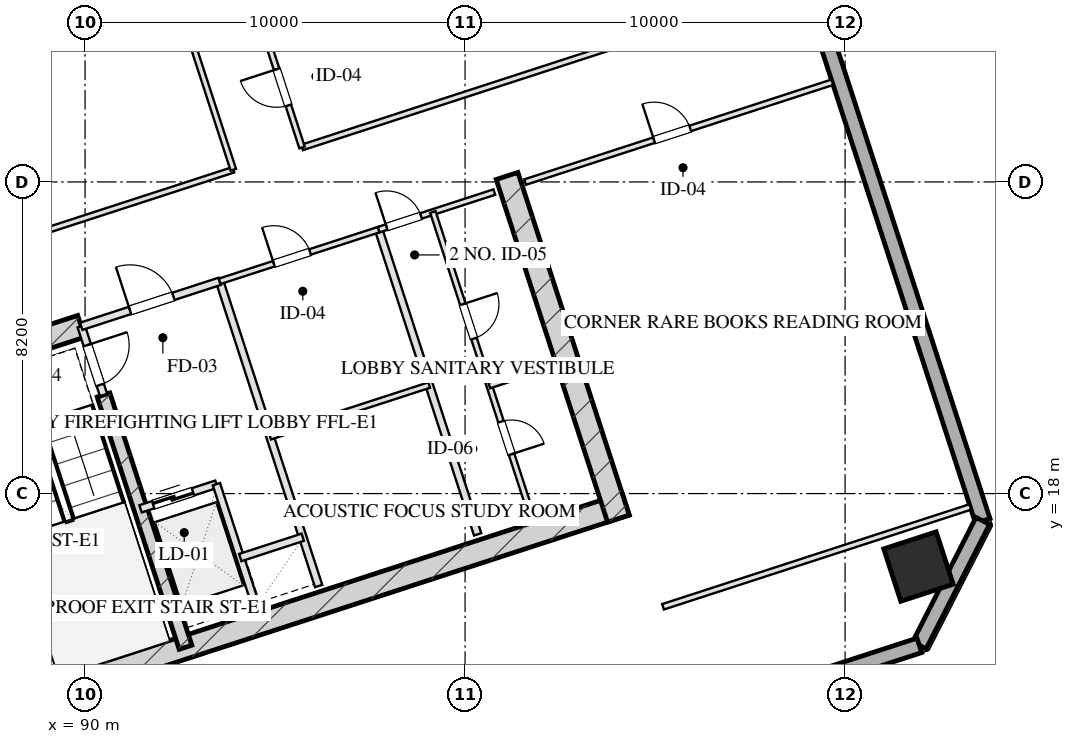
"""IFC4 building model, lengths in metres.
Left out: names, types, materials, properties, quantities, classifications, styles, units other than length and angle.
Written with IfcOpenShell. Run it as: python <this file> out.ifc"""

import sys

from ifc_helpers import new_model, si_unit, direction, frame, frame_2d, origin, origin_2d, place, context, subcontext, project, spatial, rectangle, hollow_rectangle, extrude, element, fill, save


model = new_model("IFC4")
c1 = context("Model", 3, precision=1e-05, world=origin(), true_north=direction((0.0, 1.0)))
c2 = subcontext(c1, "Body", "Model", "MODEL_VIEW")
j1 = project(units=[si_unit("LENGTHUNIT", "METRE"), si_unit("PLANEANGLEUNIT", "RADIAN")], contexts=[c1])
p1 = place(None, origin())
s1 = spatial("IfcSite", under=j1, at=p1, CompositionType="ELEMENT")
p2 = place(p1, origin())
s2 = spatial("IfcBuilding", under=s1, at=p2, CompositionType="ELEMENT")
p3 = place(p2, frame((0.0, 0.0, 103.5)))
s3 = spatial("IfcBuildingStorey", under=s2, at=p3, CompositionType="ELEMENT", Elevation=103.5)
p4 = place(p3, frame((88.63, 12.652, 0.0), z_axis=(0.0, 0.0, 1.0), x_axis=(0.95105714907, 0.309015046886, 0.0)))
e1 = element("IfcWall", 1, at=p4, inside=s3, PredefinedType="SHEAR", context=c2, shape_type="SweptSolid", body=[
    extrude(rectangle(XDim=16.4, YDim=0.6, at=frame_2d((8.2, 0.0))), origin(), (0.0, 0.0, 1.0), 3.45),
])
p5 = place(p3, frame((86.078, 21.475, 0.0), z_axis=(0.0, 0.0, 1.0), x_axis=(0.309017938678, -0.951056209472, 0.0)))
e2 = element("IfcWall", 2, at=p5, inside=s3, PredefinedType="SHEAR", context=c2, shape_type="SweptSolid", body=[
    extrude(rectangle(XDim=9.48, YDim=0.6, at=frame_2d((4.74, 0.0))), origin(), (0.0, 0.0, 1.0), 3.45),
])
p6 = place(p3, frame((101.105, 26.358, 0.0), z_axis=(0.0, 0.0, 1.0), x_axis=(0.309010370028, -0.95105866865, 0.0)))
e3 = element("IfcWall", 3, at=p6, inside=s3, PredefinedType="SHEAR", context=c2, shape_type="SweptSolid", body=[
    extrude(rectangle(XDim=9.48, YDim=0.6, at=frame_2d((4.74, 0.0))), origin(), (0.0, 0.0, 1.0), 3.45),
])
p7 = place(p3, frame((90.486, 20.594, 0.0), z_axis=(0.0, 0.0, 1.0), x_axis=(0.309020428229, -0.951055400562, 0.0)))
e4 = element("IfcWall", 4, at=p7, inside=s3, PredefinedType="SHEAR", context=c2, shape_type="SweptSolid", body=[
    extrude(rectangle(XDim=6.98, YDim=0.35, at=frame_2d((3.49, 0.0))), origin(), (0.0, 0.0, 1.0), 3.45),
])
p8 = place(p3, frame((85.886, 21.097, 0.0), z_axis=(0.0, 0.0, 1.0), x_axis=(0.951068073652, 0.308981422225, 0.0)))
e5 = element("IfcWall", 5, at=p8, inside=s3, PredefinedType="SHEAR", context=c2, shape_type="SweptSolid", body=[
    extrude(rectangle(XDim=4.22, YDim=0.6, at=frame_2d((2.11, 0.0))), origin(), (0.0, 0.0, 1.0), 3.45),
])
p9 = place(p3, frame((111.931, 16.08, 0.0), z_axis=(0.0, 0.0, 1.0), x_axis=(0.951056516295, 0.309016994375, 0.0)))
e6 = element("IfcColumn", 6, at=p9, inside=s3, PredefinedType="COLUMN", context=c2, shape_type="SweptSolid", body=[
    extrude(hollow_rectangle(XDim=1.45, YDim=1.45, WallThickness=0.05, at=origin_2d()), origin(), (0.0, 0.0, 1.0), 3.451),
])
p10 = place(p3, frame((99.284, 61.41, 0.0), z_axis=(0.0, 0.0, 1.0), x_axis=(0.309017542002, -0.95105633836, 0.0)))
e7 = element("IfcWall", 7, at=p10, inside=s3, PredefinedType="SOLIDWALL", context=c2, shape_type="SweptSolid", body=[
    extrude(rectangle(XDim=46.4, YDim=0.4, at=frame_2d((23.2, 0.0))), origin(), (0.0, 0.0, 1.0), 2.61),
])
p11 = place(p10, frame((25.746, 0.0, 0.0)))
e8 = element("IfcOpeningElement", 8, at=p11, cuts=e7, PredefinedType="OPENING", context=c2, shape_type="SweptSolid", body=[
    extrude(rectangle(XDim=1.1, YDim=2.15, at=frame_2d((0.55, 1.075))), frame((0.0, 0.21, 0.0), z_axis=(0.0, -1.0, 0.0), x_axis=(1.0, 0.0, 0.0)), (0.0, 0.0, 1.0), 0.42),
])
p12 = place(p3, frame((113.623, 17.281, 0.0), z_axis=(0.0, 0.0, 1.0), x_axis=(-0.454026238093, -0.890988313685, 0.0)))
e9 = element("IfcWall", 9, at=p12, inside=s3, PredefinedType="SOLIDWALL", context=c2, shape_type="SweptSolid", body=[
    extrude(rectangle(XDim=3.677, YDim=0.4, at=frame_2d((1.838, 0.0))), origin(), (0.0, 0.0, 1.0), 2.61),
])
p13 = place(p3, frame((111.953, 14.005, 0.0), z_axis=(0.0, 0.0, 1.0), x_axis=(-0.95105505922, -0.309021478754, 0.0)))
e10 = element("IfcWall", 10, at=p13, inside=s3, PredefinedType="SOLIDWALL", context=c2, shape_type="SweptSolid", body=[
    extrude(rectangle(XDim=29.4, YDim=0.4, at=frame_2d((14.7, 0.0))), origin(), (0.0, 0.0, 1.0), 2.61),
])
p14 = place(p3, frame((89.899, 22.401, 0.0), z_axis=(0.0, 0.0, 1.0), x_axis=(0.308932062672, -0.951084108086, 0.0)))
e11 = element("IfcWall", 11, at=p14, inside=s3, PredefinedType="PARTITIONING", context=c2, shape_type="SweptSolid", body=[
    extrude(rectangle(XDim=1.9, YDim=0.2, at=frame_2d((0.95, 0.0))), origin(), (0.0, 0.0, 1.0), 3.175),
])
p15 = place(p14, frame((0.52, 0.0, 0.0)))
e12 = element("IfcOpeningElement", 12, at=p15, cuts=e11, PredefinedType="OPENING", context=c2, shape_type="SweptSolid", body=[
    extrude(rectangle(XDim=1.1, YDim=2.05, at=frame_2d((0.55, 1.025))), frame((0.0, 0.11, 0.0), z_axis=(0.0, -1.0, 0.0), x_axis=(1.0, 0.0, 0.0)), (0.0, 0.0, 1.0), 0.22),
])
p16 = place(p3, frame((93.542, 23.585, 0.0), z_axis=(0.0, 0.0, 1.0), x_axis=(0.309042196757, -0.951048327176, 0.0)))
e13 = element("IfcWall", 13, at=p16, inside=s3, PredefinedType="PARTITIONING", context=c2, shape_type="SweptSolid", body=[
    extrude(rectangle(XDim=8.43, YDim=0.2, at=frame_2d((4.215, 0.0))), origin(), (0.0, 0.0, 1.0), 3.175),
])
p17 = place(p3, frame((89.899, 22.401, 0.0), z_axis=(0.0, 0.0, 1.0), x_axis=(0.951046716504, 0.309047153403, 0.0)))
e14 = element("IfcWall", 14, at=p17, inside=s3, PredefinedType="PARTITIONING", context=c2, shape_type="SweptSolid", body=[
    extrude(rectangle(XDim=3.83, YDim=0.2, at=frame_2d((1.915, 0.0))), origin(), (0.0, 0.0, 1.0), 3.175),
])
p18 = place(p17, frame((1.35, 0.0, 0.0)))
e15 = element("IfcOpeningElement", 15, at=p18, cuts=e14, PredefinedType="OPENING", context=c2, shape_type="SweptSolid", body=[
    extrude(rectangle(XDim=1.2, YDim=2.05, at=frame_2d((0.6, 1.025))), frame((0.0, 0.11, 0.0), z_axis=(0.0, -1.0, 0.0), x_axis=(1.0, 0.0, 0.0)), (0.0, 0.0, 1.0), 0.22),
])
p19 = place(p3, frame((91.46, 17.598, 0.0), z_axis=(0.0, 0.0, 1.0), x_axis=(0.951062257173, 0.308999325213, 0.0)))
e16 = element("IfcWall", 16, at=p19, inside=s3, PredefinedType="PARTITIONING", context=c2, shape_type="SweptSolid", body=[
    extrude(rectangle(XDim=2.1, YDim=0.2, at=frame_2d((1.05, 0.0))), origin(), (0.0, 0.0, 1.0), 3.175),
])
p20 = place(p19, frame((0.35, 0.0, 0.0)))
e17 = element("IfcOpeningElement", 17, at=p20, cuts=e16, PredefinedType="OPENING", context=c2, shape_type="SweptSolid", body=[
    extrude(rectangle(XDim=1.1, YDim=2.05, at=frame_2d((0.55, 1.025))), frame((0.0, 0.11, 0.0), z_axis=(0.0, -1.0, 0.0), x_axis=(1.0, 0.0, 0.0)), (0.0, 0.0, 1.0), 0.22),
])
p21 = place(p3, frame((93.457, 18.247, 0.0), z_axis=(0.0, 0.0, 1.0), x_axis=(0.3089935693, -0.951064127245, 0.0)))
e18 = element("IfcWall", 18, at=p21, inside=s3, PredefinedType="PARTITIONING", context=c2, shape_type="SweptSolid", body=[
    extrude(rectangle(XDim=3.7, YDim=0.2, at=frame_2d((1.85, 0.0))), origin(), (0.0, 0.0, 1.0), 3.175),
])
p22 = place(p3, frame((94.084, 16.317, 0.0), z_axis=(0.0, 0.0, 1.0), x_axis=(0.951041328149, 0.309063734775, 0.0)))
e19 = element("IfcWall", 19, at=p22, inside=s3, PredefinedType="PARTITIONING", context=c2, shape_type="SweptSolid", body=[
    extrude(rectangle(XDim=1.73, YDim=0.2, at=frame_2d((0.865, 0.0))), origin(), (0.0, 0.0, 1.0), 3.175),
])
p23 = place(p3, frame((97.727, 24.944, 0.0), z_axis=(0.0, 0.0, 1.0), x_axis=(0.309016001439, -0.951056838919, 0.0)))
e20 = element("IfcWall", 20, at=p23, inside=s3, PredefinedType="PARTITIONING", context=c2, shape_type="SweptSolid", body=[
    extrude(rectangle(XDim=8.43, YDim=0.2, at=frame_2d((4.215, 0.0))), origin(), (0.0, 0.0, 1.0), 3.175),
])
p24 = place(p3, frame((93.542, 23.585, 0.0), z_axis=(0.0, 0.0, 1.0), x_axis=(0.951063829732, 0.308994485023, 0.0)))
e21 = element("IfcWall", 21, at=p24, inside=s3, PredefinedType="PARTITIONING", context=c2, shape_type="SweptSolid", body=[
    extrude(rectangle(XDim=4.4, YDim=0.15, at=frame_2d((2.2, 0.0))), origin(), (0.0, 0.0, 1.0), 3.175),
])
p25 = place(p24, frame((1.5, 0.0, 0.0)))
e22 = element("IfcOpeningElement", 22, at=p25, cuts=e21, PredefinedType="OPENING", context=c2, shape_type="SweptSolid", body=[
    extrude(rectangle(XDim=1.0, YDim=2.05, at=frame_2d((0.5, 1.025))), frame((0.0, 0.085, 0.0), z_axis=(0.0, -1.0, 0.0), x_axis=(1.0, 0.0, 0.0)), (0.0, 0.0, 1.0), 0.17),
])
p26 = place(p3, frame((94.871, 19.495, 0.0), z_axis=(0.0, 0.0, 1.0), x_axis=(0.951042223598, 0.309060979314, 0.0)))
e23 = element("IfcWall", 23, at=p26, inside=s3, PredefinedType="PARTITIONING", context=c2, shape_type="SweptSolid", body=[
    extrude(rectangle(XDim=4.4, YDim=0.15, at=frame_2d((2.2, 0.0))), origin(), (0.0, 0.0, 1.0), 3.175),
])
p27 = place(p3, frame((97.727, 24.944, 0.0), z_axis=(0.0, 0.0, 1.0), x_axis=(0.951036872128, 0.309077446369, 0.0)))
e24 = element("IfcWall", 24, at=p27, inside=s3, PredefinedType="PARTITIONING", context=c2, shape_type="SweptSolid", body=[
    extrude(rectangle(XDim=3.2, YDim=0.15, at=frame_2d((1.6, 0.0))), origin(), (0.0, 0.0, 1.0), 3.175),
])
p28 = place(p27, frame((0.22, 0.0, 0.0)))
e25 = element("IfcOpeningElement", 25, at=p28, cuts=e24, PredefinedType="OPENING", context=c2, shape_type="SweptSolid", body=[
    extrude(rectangle(XDim=0.95, YDim=2.05, at=frame_2d((0.475, 1.025))), frame((0.0, 0.085, 0.0), z_axis=(0.0, -1.0, 0.0), x_axis=(1.0, 0.0, 0.0)), (0.0, 0.0, 1.0), 0.17),
])
p29 = place(p3, frame((99.153, 25.408, 0.0), z_axis=(0.0, 0.0, 1.0), x_axis=(0.309016001439, -0.951056838919, 0.0)))
e26 = element("IfcWall", 26, at=p29, inside=s3, PredefinedType="PARTITIONING", context=c2, shape_type="SweptSolid", body=[
    extrude(rectangle(XDim=8.43, YDim=0.15, at=frame_2d((4.215, 0.0))), origin(), (0.0, 0.0, 1.0), 3.175),
])
p30 = place(p29, frame((2.55, 0.0, 0.0)))
e27 = element("IfcOpeningElement", 27, at=p30, cuts=e26, PredefinedType="OPENING", context=c2, shape_type="SweptSolid", body=[
    extrude(rectangle(XDim=0.95, YDim=2.05, at=frame_2d((0.475, 1.025))), frame((0.0, 0.085, 0.0), z_axis=(0.0, -1.0, 0.0), x_axis=(1.0, 0.0, 0.0)), (0.0, 0.0, 1.0), 0.17),
])
p31 = place(p29, frame((5.8, 0.0, 0.0)))
e28 = element("IfcOpeningElement", 28, at=p31, cuts=e26, PredefinedType="OPENING", context=c2, shape_type="SweptSolid", body=[
    extrude(rectangle(XDim=0.9, YDim=2.05, at=frame_2d((0.45, 1.025))), frame((0.0, 0.085, 0.0), z_axis=(0.0, -1.0, 0.0), x_axis=(1.0, 0.0, 0.0)), (0.0, 0.0, 1.0), 0.17),
])
p32 = place(p3, frame((100.636, 20.843, 0.0), z_axis=(0.0, 0.0, 1.0), x_axis=(0.951040401051, 0.309066587596, 0.0)))
e29 = element("IfcWall", 29, at=p32, inside=s3, PredefinedType="PARTITIONING", context=c2, shape_type="SweptSolid", body=[
    extrude(rectangle(XDim=1.7, YDim=0.15, at=frame_2d((0.85, 0.0))), origin(), (0.0, 0.0, 1.0), 3.175),
])
p33 = place(p3, frame((105.209, 15.021, 0.0), z_axis=(0.0, 0.0, 1.0), x_axis=(0.951054329824, 0.309023723562, 0.0)))
e30 = element("IfcWall", 30, at=p33, inside=s3, PredefinedType="PARTITIONING", context=c2, shape_type="SweptSolid", body=[
    extrude(rectangle(XDim=8.5, YDim=0.15, at=frame_2d((4.25, 0.0))), origin(), (0.0, 0.0, 1.0), 3.175),
])
p34 = place(p3, frame((101.578, 26.196, 0.0), z_axis=(0.0, 0.0, 1.0), x_axis=(0.951062770994, 0.308997743729, 0.0)))
e31 = element("IfcWall", 31, at=p34, inside=s3, PredefinedType="PARTITIONING", context=c2, shape_type="SweptSolid", body=[
    extrude(rectangle(XDim=8.5, YDim=0.15, at=frame_2d((4.25, 0.0))), origin(), (0.0, 0.0, 1.0), 3.175),
])
p35 = place(p34, frame((3.57, 0.0, 0.0)))
e32 = element("IfcOpeningElement", 32, at=p35, cuts=e31, PredefinedType="OPENING", context=c2, shape_type="SweptSolid", body=[
    extrude(rectangle(XDim=1.0, YDim=2.05, at=frame_2d((0.5, 1.025))), frame((0.0, 0.085, 0.0), z_axis=(0.0, -1.0, 0.0), x_axis=(1.0, 0.0, 0.0)), (0.0, 0.0, 1.0), 0.17),
])
p36 = place(p3, frame((85.676, 23.847, 0.0), z_axis=(0.0, 0.0, 1.0), x_axis=(0.951063309554, 0.308996086091, 0.0)))
e33 = element("IfcWall", 33, at=p36, inside=s3, PredefinedType="PARTITIONING", context=c2, shape_type="SweptSolid", body=[
    extrude(rectangle(XDim=8.65, YDim=0.15, at=frame_2d((4.325, 0.0))), origin(), (0.0, 0.0, 1.0), 3.175),
])
p37 = place(p3, frame((95.709, 27.107, 0.0), z_axis=(0.0, 0.0, 1.0), x_axis=(0.951056688031, 0.309016465825, 0.0)))
e34 = element("IfcWall", 34, at=p37, inside=s3, PredefinedType="PARTITIONING", context=c2, shape_type="SweptSolid", body=[
    extrude(rectangle(XDim=13.8, YDim=0.15, at=frame_2d((6.9, 0.0))), origin(), (0.0, 0.0, 1.0), 3.175),
])
p38 = place(p3, frame((93.903, 26.52, 0.0), z_axis=(0.0, 0.0, 1.0), x_axis=(-0.30901773025, 0.951056277195, 0.0)))
e35 = element("IfcWall", 35, at=p38, inside=s3, PredefinedType="PARTITIONING", context=c2, shape_type="SweptSolid", body=[
    extrude(rectangle(XDim=16.64, YDim=0.15, at=frame_2d((8.32, 0.0))), origin(), (0.0, 0.0, 1.0), 3.175),
])
p39 = place(p3, frame((95.709, 27.107, 0.0), z_axis=(0.0, 0.0, 1.0), x_axis=(-0.30901773025, 0.951056277195, 0.0)))
e36 = element("IfcWall", 36, at=p39, inside=s3, PredefinedType="PARTITIONING", context=c2, shape_type="SweptSolid", body=[
    extrude(rectangle(XDim=16.64, YDim=0.15, at=frame_2d((8.32, 0.0))), origin(), (0.0, 0.0, 1.0), 3.175),
])
p40 = place(p39, frame((1.164, 0.0, 0.0)))
e37 = element("IfcOpeningElement", 37, at=p40, cuts=e36, PredefinedType="OPENING", context=c2, shape_type="SweptSolid", body=[
    extrude(rectangle(XDim=1.0, YDim=2.05, at=frame_2d((0.5, 1.025))), frame((0.0, 0.085, 0.0), z_axis=(0.0, -1.0, 0.0), x_axis=(1.0, 0.0, 0.0)), (0.0, 0.0, 1.0), 0.17),
])
p41 = place(p39, frame((4.724, 0.0, 0.0)))
e38 = element("IfcOpeningElement", 38, at=p41, cuts=e36, PredefinedType="OPENING", context=c2, shape_type="SweptSolid", body=[
    extrude(rectangle(XDim=1.0, YDim=2.05, at=frame_2d((0.5, 1.025))), frame((0.0, 0.085, 0.0), z_axis=(0.0, -1.0, 0.0), x_axis=(1.0, 0.0, 0.0)), (0.0, 0.0, 1.0), 0.17),
])
p42 = place(p39, frame((7.82, 0.0, 0.0)))
e39 = element("IfcOpeningElement", 39, at=p42, cuts=e36, PredefinedType="OPENING", context=c2, shape_type="SweptSolid", body=[
    extrude(rectangle(XDim=1.05, YDim=2.05, at=frame_2d((0.525, 1.025))), frame((0.0, 0.085, 0.0), z_axis=(0.0, -1.0, 0.0), x_axis=(1.0, 0.0, 0.0)), (0.0, 0.0, 1.0), 0.17),
])
p43 = place(p39, frame((10.92, 0.0, 0.0)))
e40 = element("IfcOpeningElement", 40, at=p43, cuts=e36, PredefinedType="OPENING", context=c2, shape_type="SweptSolid", body=[
    extrude(rectangle(XDim=1.0, YDim=2.05, at=frame_2d((0.5, 1.025))), frame((0.0, 0.085, 0.0), z_axis=(0.0, -1.0, 0.0), x_axis=(1.0, 0.0, 0.0)), (0.0, 0.0, 1.0), 0.17),
])
p44 = place(p39, frame((14.48, 0.0, 0.0)))
e41 = element("IfcOpeningElement", 41, at=p44, cuts=e36, PredefinedType="OPENING", context=c2, shape_type="SweptSolid", body=[
    extrude(rectangle(XDim=1.0, YDim=2.05, at=frame_2d((0.5, 1.025))), frame((0.0, 0.085, 0.0), z_axis=(0.0, -1.0, 0.0), x_axis=(1.0, 0.0, 0.0)), (0.0, 0.0, 1.0), 0.17),
])
p45 = place(p15, origin())
e42 = element("IfcDoor", 42, at=p45, inside=s3, OperationType="SINGLE_SWING_LEFT", PredefinedType="DOOR", context=c2, shape_type="SweptSolid", body=[
    extrude(rectangle(XDim=1.1, YDim=2.05, at=frame_2d((0.55, 1.025))), frame((0.0, 0.025, 0.0), z_axis=(0.0, -1.0, 0.0), x_axis=(1.0, 0.0, 0.0)), (0.0, 0.0, 1.0), 0.05),
])
fill(e12, e42)
p46 = place(p18, origin())
e43 = element("IfcDoor", 43, at=p46, inside=s3, OperationType="SINGLE_SWING_LEFT", PredefinedType="DOOR", context=c2, shape_type="SweptSolid", body=[
    extrude(rectangle(XDim=1.2, YDim=2.05, at=frame_2d((0.6, 1.025))), frame((0.0, 0.025, 0.0), z_axis=(0.0, -1.0, 0.0), x_axis=(1.0, 0.0, 0.0)), (0.0, 0.0, 1.0), 0.05),
])
fill(e15, e43)
p47 = place(p20, origin())
e44 = element("IfcDoor", 44, at=p47, inside=s3, OperationType="DOUBLE_DOOR_SLIDING", PredefinedType="DOOR", context=c2, shape_type="SweptSolid", body=[
    extrude(rectangle(XDim=1.1, YDim=2.05, at=frame_2d((0.55, 1.025))), frame((0.0, 0.025, 0.0), z_axis=(0.0, -1.0, 0.0), x_axis=(1.0, 0.0, 0.0)), (0.0, 0.0, 1.0), 0.05),
])
fill(e17, e44)
p48 = place(p25, origin())
e45 = element("IfcDoor", 45, at=p48, inside=s3, OperationType="SINGLE_SWING_LEFT", PredefinedType="DOOR", context=c2, shape_type="SweptSolid", body=[
    extrude(rectangle(XDim=1.0, YDim=2.05, at=frame_2d((0.5, 1.025))), frame((0.0, 0.025, 0.0), z_axis=(0.0, -1.0, 0.0), x_axis=(1.0, 0.0, 0.0)), (0.0, 0.0, 1.0), 0.05),
])
fill(e22, e45)
p49 = place(p28, origin())
e46 = element("IfcDoor", 46, at=p49, inside=s3, OperationType="SINGLE_SWING_LEFT", PredefinedType="DOOR", context=c2, shape_type="SweptSolid", body=[
    extrude(rectangle(XDim=0.95, YDim=2.05, at=frame_2d((0.475, 1.025))), frame((0.0, 0.025, 0.0), z_axis=(0.0, -1.0, 0.0), x_axis=(1.0, 0.0, 0.0)), (0.0, 0.0, 1.0), 0.05),
])
fill(e25, e46)
p50 = place(p30, origin())
e47 = element("IfcDoor", 47, at=p50, inside=s3, OperationType="SINGLE_SWING_LEFT", PredefinedType="DOOR", context=c2, shape_type="SweptSolid", body=[
    extrude(rectangle(XDim=0.95, YDim=2.05, at=frame_2d((0.475, 1.025))), frame((0.0, 0.025, 0.0), z_axis=(0.0, -1.0, 0.0), x_axis=(1.0, 0.0, 0.0)), (0.0, 0.0, 1.0), 0.05),
])
fill(e27, e47)
p51 = place(p31, origin())
e48 = element("IfcDoor", 48, at=p51, inside=s3, OperationType="SINGLE_SWING_RIGHT", PredefinedType="DOOR", context=c2, shape_type="SweptSolid", body=[
    extrude(rectangle(XDim=0.9, YDim=2.05, at=frame_2d((0.45, 1.025))), frame((0.0, 0.025, 0.0), z_axis=(0.0, -1.0, 0.0), x_axis=(1.0, 0.0, 0.0)), (0.0, 0.0, 1.0), 0.05),
])
fill(e28, e48)
p52 = place(p35, origin())
e49 = element("IfcDoor", 49, at=p52, inside=s3, OperationType="SINGLE_SWING_LEFT", PredefinedType="DOOR", context=c2, shape_type="SweptSolid", body=[
    extrude(rectangle(XDim=1.0, YDim=2.05, at=frame_2d((0.5, 1.025))), frame((0.0, 0.025, 0.0), z_axis=(0.0, -1.0, 0.0), x_axis=(1.0, 0.0, 0.0)), (0.0, 0.0, 1.0), 0.05),
])
fill(e32, e49)
p53 = place(p40, origin())
e50 = element("IfcDoor", 50, at=p53, inside=s3, OperationType="SINGLE_SWING_RIGHT", PredefinedType="DOOR", context=c2, shape_type="SweptSolid", body=[
    extrude(rectangle(XDim=1.0, YDim=2.05, at=frame_2d((0.5, 1.025))), frame((0.0, 0.025, 0.0), z_axis=(0.0, -1.0, 0.0), x_axis=(1.0, 0.0, 0.0)), (0.0, 0.0, 1.0), 0.05),
])
fill(e37, e50)
save(model, sys.argv[1])
